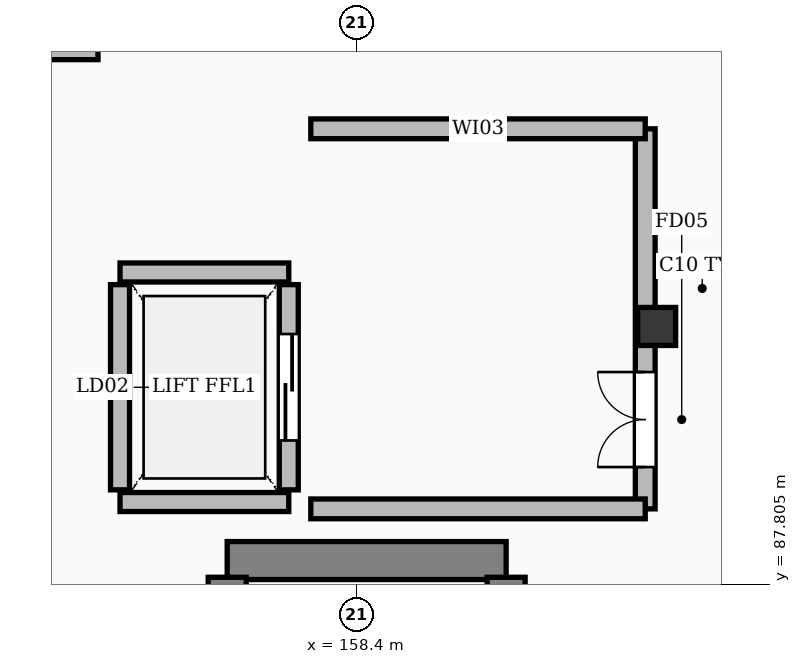
"""IFC4 building model, lengths in metres.
Left out: names, types, materials, properties, quantities, classifications, styles, units other than length and angle.
Written with IfcOpenShell. Run it as: python <this file> out.ifc"""

import sys

from ifc_helpers import new_model, si_unit, direction, frame, frame_2d, origin, origin_2d, place, context, subcontext, project, spatial, rectangle, extrude, element, fill, save


model = new_model("IFC4")
c1 = context("Model", 3, precision=1e-05, world=origin(), true_north=direction((0.0, 1.0)))
c2 = subcontext(c1, "Body", "Model", "MODEL_VIEW")
j1 = project(units=[si_unit("LENGTHUNIT", "METRE"), si_unit("PLANEANGLEUNIT", "RADIAN")], contexts=[c1])
p1 = place(None, origin())
s1 = spatial("IfcSite", under=j1, at=p1, CompositionType="ELEMENT")
p2 = place(p1, origin())
s2 = spatial("IfcBuilding", under=s1, at=p2, CompositionType="ELEMENT")
p3 = place(p2, frame((0.0, 0.0, 50.4)))
s3 = spatial("IfcBuildingStorey", under=s2, at=p3, CompositionType="ELEMENT", Elevation=50.4)
p4 = place(p3, frame((162.35, 91.2, 0.0), z_axis=(0.0, 0.0, 1.0), x_axis=(1.0, 0.0, 0.0)))
e1 = element("IfcColumn", 1, at=p4, inside=s3, PredefinedType="COLUMN", context=c2, shape_type="SweptSolid", body=[
    extrude(rectangle(XDim=0.5, YDim=0.5, at=origin_2d()), origin(), (0.0, 0.0, 1.0), 4.2),
])
p5 = place(p3, frame((156.7, 88.12, 0.0), z_axis=(0.0, 0.0, 1.0), x_axis=(1.0, 0.0, 0.0)))
e2 = element("IfcWall", 2, at=p5, inside=s3, PredefinedType="SHEAR", context=c2, shape_type="SweptSolid", body=[
    extrude(rectangle(XDim=3.67, YDim=0.5, at=frame_2d((1.835, 0.0))), origin(), (0.0, 0.0, 1.0), 3.96),
])
p6 = place(p3, frame((156.7, 77.4, 0.0), z_axis=(0.0, 0.0, 1.0), x_axis=(0.0, 1.0, 0.0)))
e3 = element("IfcWall", 3, at=p6, inside=s3, PredefinedType="SHEAR", context=c2, shape_type="SweptSolid", body=[
    extrude(rectangle(XDim=10.5, YDim=0.5, at=frame_2d((5.25, 0.0))), origin(), (0.0, 0.0, 1.0), 3.96),
])
p7 = place(p3, frame((160.37, 77.4, 0.0), z_axis=(0.0, 0.0, 1.0), x_axis=(0.0, 1.0, 0.0)))
e4 = element("IfcWall", 4, at=p7, inside=s3, PredefinedType="SHEAR", context=c2, shape_type="SweptSolid", body=[
    extrude(rectangle(XDim=10.5, YDim=0.5, at=frame_2d((5.25, 0.0))), origin(), (0.0, 0.0, 1.0), 3.96),
])
p8 = place(p7, frame((0.45, 0.0, 0.0)))
e5 = element("IfcOpeningElement", 5, at=p8, cuts=e4, PredefinedType="OPENING", context=c2, shape_type="SweptSolid", body=[
    extrude(rectangle(XDim=1.3, YDim=2.15, at=frame_2d((0.65, 1.075))), frame((0.0, 0.262, 0.0), z_axis=(0.0, -1.0, 0.0), x_axis=(1.0, 0.0, 0.0)), (0.0, 0.0, 1.0), 0.524),
])
for number, where, z_axis, x_axis in (
    (6, (155.29, 88.89, 0.0), (0.0, 0.0, 1.0), (1.0, 0.0, 0.0)),
    (7, (155.29, 91.91, 0.0), (0.0, 0.0, 1.0), (1.0, 0.0, 0.0)),
):
    element("IfcWall", number, at=place(p3, frame(where, z_axis=z_axis, x_axis=x_axis)), inside=s3, PredefinedType="SOLIDWALL", context=c2, shape_type="SweptSolid", body=[
        extrude(rectangle(XDim=2.22, YDim=0.25, at=frame_2d((1.11, 0.0))), origin(), (0.0, 0.0, 1.0), 3.96),
    ])
p9 = place(p3, frame((155.29, 89.05, 0.0), z_axis=(0.0, 0.0, 1.0), x_axis=(0.0, 1.0, 0.0)))
e8 = element("IfcWall", 8, at=p9, inside=s3, PredefinedType="SOLIDWALL", context=c2, shape_type="SweptSolid", body=[
    extrude(rectangle(XDim=2.7, YDim=0.25, at=frame_2d((1.35, 0.0))), origin(), (0.0, 0.0, 1.0), 3.96),
])
p10 = place(p3, frame((157.51, 89.05, 0.0), z_axis=(0.0, 0.0, 1.0), x_axis=(0.0, 1.0, 0.0)))
e9 = element("IfcWall", 9, at=p10, inside=s3, PredefinedType="SOLIDWALL", context=c2, shape_type="SweptSolid", body=[
    extrude(rectangle(XDim=2.7, YDim=0.25, at=frame_2d((1.35, 0.0))), origin(), (0.0, 0.0, 1.0), 3.96),
])
p11 = place(p10, frame((0.65, 0.0, 0.0)))
e10 = element("IfcOpeningElement", 10, at=p11, cuts=e9, PredefinedType="OPENING", context=c2, shape_type="SweptSolid", body=[
    extrude(rectangle(XDim=1.4, YDim=2.3, at=frame_2d((0.7, 1.15))), frame((0.0, 0.137, 0.0), z_axis=(0.0, -1.0, 0.0), x_axis=(1.0, 0.0, 0.0)), (0.0, 0.0, 1.0), 0.274),
])
p12 = place(p3, frame((162.2, 88.8, 0.0), z_axis=(0.0, 0.0, 1.0), x_axis=(0.0, 1.0, 0.0)))
e11 = element("IfcWall", 11, at=p12, inside=s3, PredefinedType="SOLIDWALL", context=c2, shape_type="SweptSolid", body=[
    extrude(rectangle(XDim=5.0, YDim=0.26, at=frame_2d((2.5, 0.0))), origin(), (0.0, 0.0, 1.0), 3.352),
])
p13 = place(p12, frame((0.55, 0.0, 0.0)))
e12 = element("IfcOpeningElement", 12, at=p13, cuts=e11, PredefinedType="OPENING", context=c2, shape_type="SweptSolid", body=[
    extrude(rectangle(XDim=1.25, YDim=2.15, at=frame_2d((0.625, 1.075))), frame((0.0, 0.142, 0.0), z_axis=(0.0, -1.0, 0.0), x_axis=(1.0, 0.0, 0.0)), (0.0, 0.0, 1.0), 0.284),
])
for number, where, z_axis, x_axis in (
    (13, (157.8, 88.8, 0.0), (0.0, 0.0, 1.0), (1.0, 0.0, 0.0)),
    (14, (157.8, 93.8, 0.0), (0.0, 0.0, 1.0), (1.0, 0.0, 0.0)),
):
    element("IfcWall", number, at=place(p3, frame(where, z_axis=z_axis, x_axis=x_axis)), inside=s3, PredefinedType="SOLIDWALL", context=c2, shape_type="SweptSolid", body=[
        extrude(rectangle(XDim=4.4, YDim=0.26, at=frame_2d((2.2, 0.0))), origin(), (0.0, 0.0, 1.0), 3.352),
    ])
p14 = place(p3, frame((153.6, 94.8, 0.0), z_axis=(0.0, 0.0, 1.0), x_axis=(1.0, 0.0, 0.0)))
e15 = element("IfcWall", 15, at=p14, inside=s3, PredefinedType="PARTITIONING", context=c2, shape_type="SweptSolid", body=[
    extrude(rectangle(XDim=1.4, YDim=0.18, at=frame_2d((0.7, 0.0))), origin(), (0.0, 0.0, 1.0), 3.96),
])
p15 = place(p11, origin())
e16 = element("IfcDoor", 16, at=p15, inside=s3, OperationType="SLIDING_TO_LEFT", PredefinedType="DOOR", context=c2, shape_type="SweptSolid", body=[
    extrude(rectangle(XDim=1.4, YDim=2.3, at=frame_2d((0.7, 1.15))), frame((0.0, 0.025, 0.0), z_axis=(0.0, -1.0, 0.0), x_axis=(1.0, 0.0, 0.0)), (0.0, 0.0, 1.0), 0.05),
])
fill(e10, e16)
p16 = place(p13, origin())
e17 = element("IfcDoor", 17, at=p16, inside=s3, OperationType="DOUBLE_DOOR_SINGLE_SWING", PredefinedType="DOOR", context=c2, shape_type="SweptSolid", body=[
    extrude(rectangle(XDim=1.25, YDim=2.15, at=frame_2d((0.625, 1.075))), frame((0.0, 0.025, 0.0), z_axis=(0.0, -1.0, 0.0), x_axis=(1.0, 0.0, 0.0)), (0.0, 0.0, 1.0), 0.05),
])
fill(e12, e17)
save(model, sys.argv[1])
